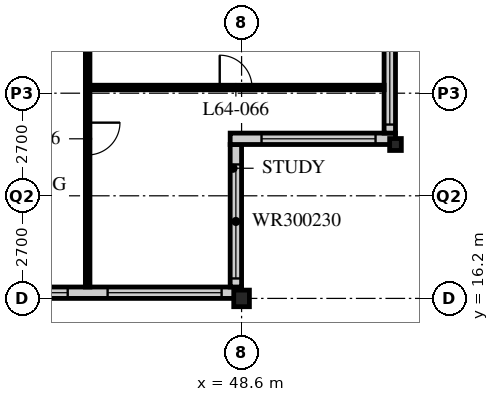
"""IFC4 building model, lengths in metres.
Left out: names, types, materials, properties, quantities, classifications, styles, units other than length and angle.
Written with IfcOpenShell. Run it as: python <this file> out.ifc"""

import sys

from ifc_helpers import new_model, si_unit, direction, frame, frame_2d, origin, origin_2d, place, context, subcontext, project, spatial, rectangle, i_section, extrude, element, fill, save


model = new_model("IFC4")
c1 = context("Model", 3, precision=1e-05, world=origin(), true_north=direction((0.0, 1.0)))
c2 = subcontext(c1, "Body", "Model", "MODEL_VIEW")
j1 = project(units=[si_unit("LENGTHUNIT", "METRE"), si_unit("PLANEANGLEUNIT", "RADIAN")], contexts=[c1])
p1 = place(None, origin())
s1 = spatial("IfcSite", under=j1, at=p1, CompositionType="ELEMENT")
p2 = place(p1, origin())
s2 = spatial("IfcBuilding", under=s1, at=p2, CompositionType="ELEMENT")
p3 = place(p2, frame((0.0, 0.0, 250.2)))
s3 = spatial("IfcBuildingStorey", under=s2, at=p3, CompositionType="ELEMENT", Elevation=250.2)
p4 = place(p3, frame((48.6, 16.2, 0.0), z_axis=(0.0, 0.0, 1.0), x_axis=(1.0, 0.0, 0.0)))
e1 = element("IfcColumn", 1, at=p4, inside=s3, PredefinedType="COLUMN", context=c2, shape_type="SweptSolid", body=[
    extrude(i_section(OverallWidth=0.412, OverallDepth=0.437, WebThickness=0.036, FlangeThickness=0.058, FilletRadius=0.015, at=origin_2d()), origin(), (0.0, 0.0, 1.0), 3.9),
])
p5 = place(p3, frame((52.65, 20.25, 0.0), z_axis=(0.0, 0.0, 1.0), x_axis=(1.0, 0.0, 0.0)))
e2 = element("IfcColumn", 2, at=p5, inside=s3, PredefinedType="COLUMN", context=c2, shape_type="SweptSolid", body=[
    extrude(i_section(OverallWidth=0.307, OverallDepth=0.314, WebThickness=0.012, FlangeThickness=0.019, FilletRadius=0.015, at=origin_2d()), origin(), (0.0, 0.0, 1.0), 3.9),
])
p6 = place(p3, frame((8.4, 16.35, 0.0), z_axis=(0.0, 0.0, 1.0), x_axis=(1.0, 0.0, 0.0)))
e3 = element("IfcWall", 3, at=p6, inside=s3, PredefinedType="SOLIDWALL", context=c2, shape_type="SweptSolid", body=[
    extrude(rectangle(XDim=40.2, YDim=0.3, at=frame_2d((20.1, 0.0))), origin(), (0.0, 0.0, 1.0), 3.69),
])
p7 = place(p6, frame((0.225, 0.0, 0.6)))
e4 = element("IfcOpeningElement", 4, at=p7, cuts=e3, PredefinedType="OPENING", context=c2, shape_type="SweptSolid", body=[
    extrude(rectangle(XDim=3.0, YDim=2.4, at=frame_2d((1.5, 1.2))), frame((0.0, 0.16, 0.0), z_axis=(0.0, -1.0, 0.0), x_axis=(1.0, 0.0, 0.0)), (0.0, 0.0, 1.0), 0.32),
])
p8 = place(p6, frame((4.275, 0.0, 0.6)))
e5 = element("IfcOpeningElement", 5, at=p8, cuts=e3, PredefinedType="OPENING", context=c2, shape_type="SweptSolid", body=[
    extrude(rectangle(XDim=3.0, YDim=2.4, at=frame_2d((1.5, 1.2))), frame((0.0, 0.16, 0.0), z_axis=(0.0, -1.0, 0.0), x_axis=(1.0, 0.0, 0.0)), (0.0, 0.0, 1.0), 0.32),
])
p9 = place(p6, frame((8.325, 0.0, 0.6)))
e6 = element("IfcOpeningElement", 6, at=p9, cuts=e3, PredefinedType="OPENING", context=c2, shape_type="SweptSolid", body=[
    extrude(rectangle(XDim=3.0, YDim=2.4, at=frame_2d((1.5, 1.2))), frame((0.0, 0.16, 0.0), z_axis=(0.0, -1.0, 0.0), x_axis=(1.0, 0.0, 0.0)), (0.0, 0.0, 1.0), 0.32),
])
p10 = place(p6, frame((12.375, 0.0, 0.6)))
e7 = element("IfcOpeningElement", 7, at=p10, cuts=e3, PredefinedType="OPENING", context=c2, shape_type="SweptSolid", body=[
    extrude(rectangle(XDim=3.0, YDim=2.4, at=frame_2d((1.5, 1.2))), frame((0.0, 0.16, 0.0), z_axis=(0.0, -1.0, 0.0), x_axis=(1.0, 0.0, 0.0)), (0.0, 0.0, 1.0), 0.32),
])
p11 = place(p6, frame((16.425, 0.0, 0.6)))
e8 = element("IfcOpeningElement", 8, at=p11, cuts=e3, PredefinedType="OPENING", context=c2, shape_type="SweptSolid", body=[
    extrude(rectangle(XDim=3.0, YDim=2.4, at=frame_2d((1.5, 1.2))), frame((0.0, 0.16, 0.0), z_axis=(0.0, -1.0, 0.0), x_axis=(1.0, 0.0, 0.0)), (0.0, 0.0, 1.0), 0.32),
])
p12 = place(p6, frame((20.475, 0.0, 0.6)))
e9 = element("IfcOpeningElement", 9, at=p12, cuts=e3, PredefinedType="OPENING", context=c2, shape_type="SweptSolid", body=[
    extrude(rectangle(XDim=3.0, YDim=2.4, at=frame_2d((1.5, 1.2))), frame((0.0, 0.16, 0.0), z_axis=(0.0, -1.0, 0.0), x_axis=(1.0, 0.0, 0.0)), (0.0, 0.0, 1.0), 0.32),
])
p13 = place(p6, frame((24.525, 0.0, 0.6)))
e10 = element("IfcOpeningElement", 10, at=p13, cuts=e3, PredefinedType="OPENING", context=c2, shape_type="SweptSolid", body=[
    extrude(rectangle(XDim=3.0, YDim=2.4, at=frame_2d((1.5, 1.2))), frame((0.0, 0.16, 0.0), z_axis=(0.0, -1.0, 0.0), x_axis=(1.0, 0.0, 0.0)), (0.0, 0.0, 1.0), 0.32),
])
p14 = place(p6, frame((28.575, 0.0, 0.6)))
e11 = element("IfcOpeningElement", 11, at=p14, cuts=e3, PredefinedType="OPENING", context=c2, shape_type="SweptSolid", body=[
    extrude(rectangle(XDim=3.0, YDim=2.4, at=frame_2d((1.5, 1.2))), frame((0.0, 0.16, 0.0), z_axis=(0.0, -1.0, 0.0), x_axis=(1.0, 0.0, 0.0)), (0.0, 0.0, 1.0), 0.32),
])
p15 = place(p6, frame((32.625, 0.0, 0.6)))
e12 = element("IfcOpeningElement", 12, at=p15, cuts=e3, PredefinedType="OPENING", context=c2, shape_type="SweptSolid", body=[
    extrude(rectangle(XDim=3.0, YDim=2.4, at=frame_2d((1.5, 1.2))), frame((0.0, 0.16, 0.0), z_axis=(0.0, -1.0, 0.0), x_axis=(1.0, 0.0, 0.0)), (0.0, 0.0, 1.0), 0.32),
])
p16 = place(p6, frame((36.675, 0.0, 0.6)))
e13 = element("IfcOpeningElement", 13, at=p16, cuts=e3, PredefinedType="OPENING", context=c2, shape_type="SweptSolid", body=[
    extrude(rectangle(XDim=3.0, YDim=2.4, at=frame_2d((1.5, 1.2))), frame((0.0, 0.16, 0.0), z_axis=(0.0, -1.0, 0.0), x_axis=(1.0, 0.0, 0.0)), (0.0, 0.0, 1.0), 0.32),
])
p17 = place(p3, frame((48.45, 16.5, 0.0), z_axis=(0.0, 0.0, 1.0), x_axis=(0.0, 1.0, 0.0)))
e14 = element("IfcWall", 14, at=p17, inside=s3, PredefinedType="SOLIDWALL", context=c2, shape_type="SweptSolid", body=[
    extrude(rectangle(XDim=3.75, YDim=0.3, at=frame_2d((1.875, 0.0))), origin(), (0.0, 0.0, 1.0), 3.69),
])
p18 = place(p17, frame((0.225, 0.0, 0.6)))
e15 = element("IfcOpeningElement", 15, at=p18, cuts=e14, PredefinedType="OPENING", context=c2, shape_type="SweptSolid", body=[
    extrude(rectangle(XDim=3.0, YDim=2.3, at=frame_2d((1.5, 1.15))), frame((0.0, 0.16, 0.0), z_axis=(0.0, -1.0, 0.0), x_axis=(1.0, 0.0, 0.0)), (0.0, 0.0, 1.0), 0.32),
])
p19 = place(p3, frame((48.3, 20.4, 0.0), z_axis=(0.0, 0.0, 1.0), x_axis=(1.0, 0.0, 0.0)))
e16 = element("IfcWall", 16, at=p19, inside=s3, PredefinedType="SOLIDWALL", context=c2, shape_type="SweptSolid", body=[
    extrude(rectangle(XDim=4.35, YDim=0.3, at=frame_2d((2.175, 0.0))), origin(), (0.0, 0.0, 1.0), 3.69),
])
p20 = place(p19, frame((0.825, 0.0, 0.6)))
e17 = element("IfcOpeningElement", 17, at=p20, cuts=e16, PredefinedType="OPENING", context=c2, shape_type="SweptSolid", body=[
    extrude(rectangle(XDim=3.0, YDim=2.3, at=frame_2d((1.5, 1.15))), frame((0.0, 0.16, 0.0), z_axis=(0.0, -1.0, 0.0), x_axis=(1.0, 0.0, 0.0)), (0.0, 0.0, 1.0), 0.32),
])
p21 = place(p3, frame((52.5, 20.55, 0.0), z_axis=(0.0, 0.0, 1.0), x_axis=(0.0, 1.0, 0.0)))
e18 = element("IfcWall", 18, at=p21, inside=s3, PredefinedType="SOLIDWALL", context=c2, shape_type="SweptSolid", body=[
    extrude(rectangle(XDim=3.75, YDim=0.3, at=frame_2d((1.875, 0.0))), origin(), (0.0, 0.0, 1.0), 3.69),
])
p22 = place(p21, frame((0.225, 0.0, 0.6)))
e19 = element("IfcOpeningElement", 19, at=p22, cuts=e18, PredefinedType="OPENING", context=c2, shape_type="SweptSolid", body=[
    extrude(rectangle(XDim=3.0, YDim=2.3, at=frame_2d((1.5, 1.15))), frame((0.0, 0.16, 0.0), z_axis=(0.0, -1.0, 0.0), x_axis=(1.0, 0.0, 0.0)), (0.0, 0.0, 1.0), 0.32),
])
p23 = place(p3, frame((44.55, 16.5, 0.0), z_axis=(0.0, 0.0, 1.0), x_axis=(0.0, 1.0, 0.0)))
e20 = element("IfcWall", 20, at=p23, inside=s3, PredefinedType="PARTITIONING", context=c2, shape_type="SweptSolid", body=[
    extrude(rectangle(XDim=7.8, YDim=0.12, at=frame_2d((3.9, 0.0))), origin(), (0.0, 0.0, 1.0), 3.69),
])
p24 = place(p23, frame((3.475, 0.0, 0.0)))
e21 = element("IfcOpeningElement", 21, at=p24, cuts=e20, PredefinedType="OPENING", context=c2, shape_type="SweptSolid", body=[
    extrude(rectangle(XDim=0.85, YDim=2.1, at=frame_2d((0.425, 1.05))), frame((0.0, 0.07, 0.0), z_axis=(0.0, -1.0, 0.0), x_axis=(1.0, 0.0, 0.0)), (0.0, 0.0, 1.0), 0.14),
])
p25 = place(p3, frame((44.55, 21.75, 0.0), z_axis=(0.0, 0.0, 1.0), x_axis=(1.0, 0.0, 0.0)))
e22 = element("IfcWall", 22, at=p25, inside=s3, PredefinedType="PARTITIONING", context=c2, shape_type="SweptSolid", body=[
    extrude(rectangle(XDim=7.8, YDim=0.12, at=frame_2d((3.9, 0.0))), origin(), (0.0, 0.0, 1.0), 3.69),
])
p26 = place(p25, frame((3.475, 0.0, 0.0)))
e23 = element("IfcOpeningElement", 23, at=p26, cuts=e22, PredefinedType="OPENING", context=c2, shape_type="SweptSolid", body=[
    extrude(rectangle(XDim=0.85, YDim=2.1, at=frame_2d((0.425, 1.05))), frame((0.0, 0.07, 0.0), z_axis=(0.0, -1.0, 0.0), x_axis=(1.0, 0.0, 0.0)), (0.0, 0.0, 1.0), 0.14),
])
p27 = place(p15, origin())
e24 = element("IfcWindow", 24, at=p27, inside=s3, PartitioningType="SINGLE_PANEL", PredefinedType="WINDOW", context=c2, shape_type="SweptSolid", body=[
    extrude(rectangle(XDim=3.0, YDim=2.4, at=frame_2d((1.5, 1.2))), frame((0.0, 0.03, 0.0), z_axis=(0.0, -1.0, 0.0), x_axis=(1.0, 0.0, 0.0)), (0.0, 0.0, 1.0), 0.06),
])
fill(e12, e24)
p28 = place(p16, origin())
e25 = element("IfcWindow", 25, at=p28, inside=s3, PartitioningType="SINGLE_PANEL", PredefinedType="WINDOW", context=c2, shape_type="SweptSolid", body=[
    extrude(rectangle(XDim=3.0, YDim=2.4, at=frame_2d((1.5, 1.2))), frame((0.0, 0.03, 0.0), z_axis=(0.0, -1.0, 0.0), x_axis=(1.0, 0.0, 0.0)), (0.0, 0.0, 1.0), 0.06),
])
fill(e13, e25)
p29 = place(p18, origin())
e26 = element("IfcWindow", 26, at=p29, inside=s3, PartitioningType="SINGLE_PANEL", PredefinedType="WINDOW", context=c2, shape_type="SweptSolid", body=[
    extrude(rectangle(XDim=3.0, YDim=2.3, at=frame_2d((1.5, 1.15))), frame((0.0, 0.03, 0.0), z_axis=(0.0, -1.0, 0.0), x_axis=(1.0, 0.0, 0.0)), (0.0, 0.0, 1.0), 0.06),
])
fill(e15, e26)
p30 = place(p20, origin())
e27 = element("IfcWindow", 27, at=p30, inside=s3, PartitioningType="SINGLE_PANEL", PredefinedType="WINDOW", context=c2, shape_type="SweptSolid", body=[
    extrude(rectangle(XDim=3.0, YDim=2.3, at=frame_2d((1.5, 1.15))), frame((0.0, 0.03, 0.0), z_axis=(0.0, -1.0, 0.0), x_axis=(1.0, 0.0, 0.0)), (0.0, 0.0, 1.0), 0.06),
])
fill(e17, e27)
p31 = place(p22, origin())
e28 = element("IfcWindow", 28, at=p31, inside=s3, PartitioningType="SINGLE_PANEL", PredefinedType="WINDOW", context=c2, shape_type="SweptSolid", body=[
    extrude(rectangle(XDim=3.0, YDim=2.3, at=frame_2d((1.5, 1.15))), frame((0.0, 0.03, 0.0), z_axis=(0.0, -1.0, 0.0), x_axis=(1.0, 0.0, 0.0)), (0.0, 0.0, 1.0), 0.06),
])
fill(e19, e28)
p32 = place(p24, origin())
e29 = element("IfcDoor", 29, at=p32, inside=s3, OperationType="SINGLE_SWING_LEFT", PredefinedType="DOOR", context=c2, shape_type="SweptSolid", body=[
    extrude(rectangle(XDim=0.85, YDim=2.1, at=frame_2d((0.425, 1.05))), frame((0.0, 0.025, 0.0), z_axis=(0.0, -1.0, 0.0), x_axis=(1.0, 0.0, 0.0)), (0.0, 0.0, 1.0), 0.05),
])
fill(e21, e29)
p33 = place(p26, origin())
e30 = element("IfcDoor", 30, at=p33, inside=s3, OperationType="SINGLE_SWING_LEFT", PredefinedType="DOOR", context=c2, shape_type="SweptSolid", body=[
    extrude(rectangle(XDim=0.85, YDim=2.1, at=frame_2d((0.425, 1.05))), frame((0.0, 0.025, 0.0), z_axis=(0.0, -1.0, 0.0), x_axis=(1.0, 0.0, 0.0)), (0.0, 0.0, 1.0), 0.05),
])
fill(e23, e30)
save(model, sys.argv[1])
